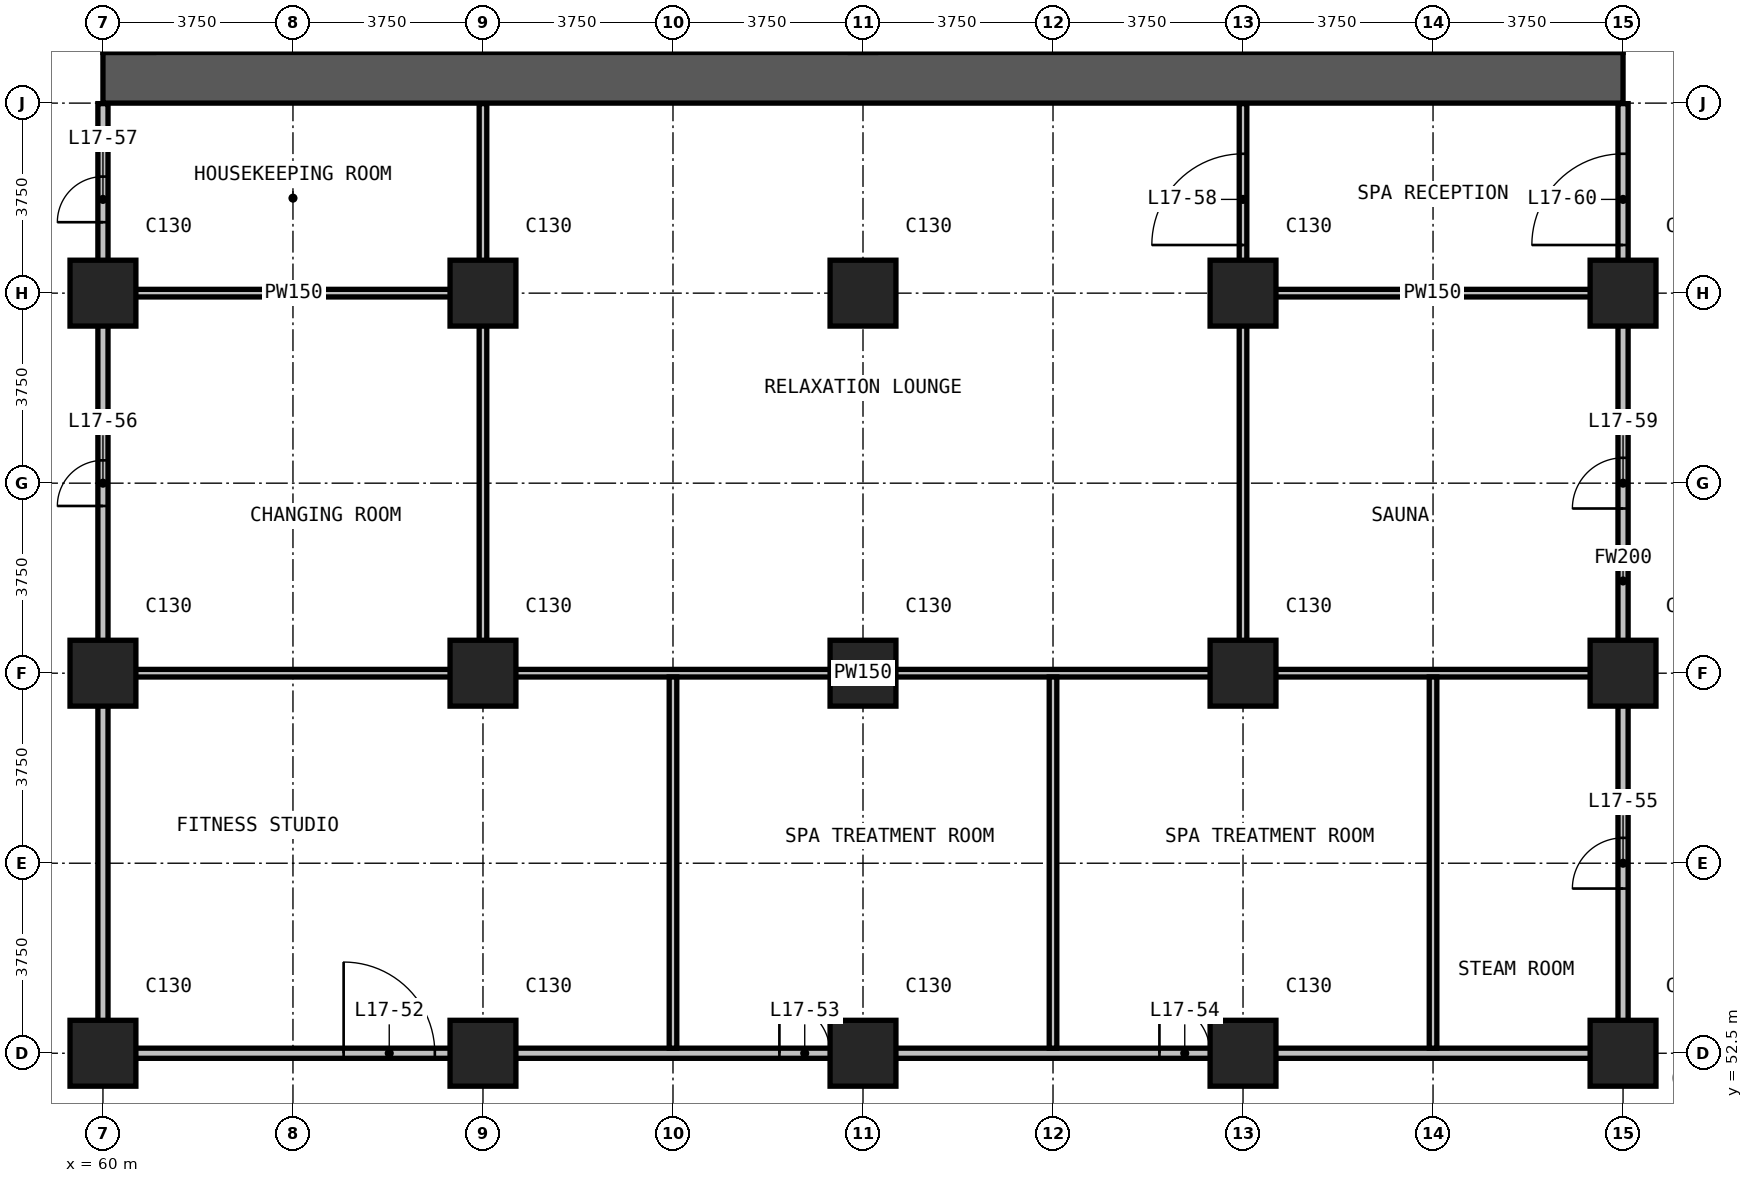
"""IFC4 building model, lengths in metres.
Left out: names, types, materials, properties, quantities, classifications, styles, units other than length and angle.
Written with IfcOpenShell. Run it as: python <this file> out.ifc"""

import sys

from ifc_helpers import new_model, si_unit, direction, frame, frame_2d, origin, origin_2d, place, context, subcontext, project, spatial, rectangle, extrude, element, fill, save


model = new_model("IFC4")
c1 = context("Model", 3, precision=1e-05, world=origin(), true_north=direction((0.0, 1.0)))
c2 = subcontext(c1, "Body", "Model", "MODEL_VIEW")
j1 = project(units=[si_unit("LENGTHUNIT", "METRE"), si_unit("PLANEANGLEUNIT", "RADIAN")], contexts=[c1])
p1 = place(None, origin())
s1 = spatial("IfcSite", under=j1, at=p1, CompositionType="ELEMENT")
p2 = place(p1, origin())
s2 = spatial("IfcBuilding", under=s1, at=p2, CompositionType="ELEMENT")
p3 = place(p2, frame((0.0, 0.0, 75.8)))
s3 = spatial("IfcBuildingStorey", under=s2, at=p3, CompositionType="ELEMENT", Elevation=75.8)
for number, where, z_axis, x_axis in (
    (1, (60.0, 52.5, 0.0), (0.0, 0.0, 1.0), (1.0, 0.0, 0.0)),
    (2, (60.0, 60.0, 0.0), (0.0, 0.0, 1.0), (1.0, 0.0, 0.0)),
    (3, (60.0, 67.5, 0.0), (0.0, 0.0, 1.0), (1.0, 0.0, 0.0)),
    (4, (67.5, 52.5, 0.0), (0.0, 0.0, 1.0), (1.0, 0.0, 0.0)),
    (5, (67.5, 60.0, 0.0), (0.0, 0.0, 1.0), (1.0, 0.0, 0.0)),
    (6, (67.5, 67.5, 0.0), (0.0, 0.0, 1.0), (1.0, 0.0, 0.0)),
    (7, (75.0, 52.5, 0.0), (0.0, 0.0, 1.0), (1.0, 0.0, 0.0)),
    (8, (75.0, 60.0, 0.0), (0.0, 0.0, 1.0), (1.0, 0.0, 0.0)),
    (9, (75.0, 67.5, 0.0), (0.0, 0.0, 1.0), (1.0, 0.0, 0.0)),
    (10, (82.5, 52.5, 0.0), (0.0, 0.0, 1.0), (1.0, 0.0, 0.0)),
    (11, (82.5, 60.0, 0.0), (0.0, 0.0, 1.0), (1.0, 0.0, 0.0)),
    (12, (82.5, 67.5, 0.0), (0.0, 0.0, 1.0), (1.0, 0.0, 0.0)),
    (13, (90.0, 52.5, 0.0), (0.0, 0.0, 1.0), (1.0, 0.0, 0.0)),
    (14, (90.0, 60.0, 0.0), (0.0, 0.0, 1.0), (1.0, 0.0, 0.0)),
    (15, (90.0, 67.5, 0.0), (0.0, 0.0, 1.0), (1.0, 0.0, 0.0)),
):
    element("IfcColumn", number, at=place(p3, frame(where, z_axis=z_axis, x_axis=x_axis)), inside=s3, PredefinedType="COLUMN", context=c2, shape_type="SweptSolid", body=[
        extrude(rectangle(XDim=1.3, YDim=1.3, at=origin_2d()), origin(), (0.0, 0.0, 1.0), 3.3),
    ])
p4 = place(p3, frame((60.0, 71.75, 0.0), z_axis=(0.0, 0.0, 1.0), x_axis=(1.0, 0.0, 0.0)))
e16 = element("IfcWall", 16, at=p4, inside=s3, PredefinedType="SHEAR", context=c2, shape_type="SweptSolid", body=[
    extrude(rectangle(XDim=30.0, YDim=1.0, at=frame_2d((15.0, 0.0))), origin(), (0.0, 0.0, 1.0), 3.3),
])
p5 = place(p3, frame((60.1, 52.5, 0.0), z_axis=(0.0, 0.0, 1.0), x_axis=(1.0, 0.0, 0.0)))
e17 = element("IfcWall", 17, at=p5, inside=s3, PredefinedType="PARTITIONING", context=c2, shape_type="SweptSolid", body=[
    extrude(rectangle(XDim=29.8, YDim=0.2, at=frame_2d((14.9, 0.0))), origin(), (0.0, 0.0, 1.0), 3.0),
])
p6 = place(p5, frame((4.65, 0.0, 0.0)))
e18 = element("IfcOpeningElement", 18, at=p6, cuts=e17, PredefinedType="OPENING", context=c2, shape_type="SweptSolid", body=[
    extrude(rectangle(XDim=1.8, YDim=2.2, at=frame_2d((0.9, 1.1))), frame((0.0, 0.11, 0.0), z_axis=(0.0, -1.0, 0.0), x_axis=(1.0, 0.0, 0.0)), (0.0, 0.0, 1.0), 0.22),
])
p7 = place(p5, frame((13.25, 0.0, 0.0)))
e19 = element("IfcOpeningElement", 19, at=p7, cuts=e17, PredefinedType="OPENING", context=c2, shape_type="SweptSolid", body=[
    extrude(rectangle(XDim=1.0, YDim=2.2, at=frame_2d((0.5, 1.1))), frame((0.0, 0.11, 0.0), z_axis=(0.0, -1.0, 0.0), x_axis=(1.0, 0.0, 0.0)), (0.0, 0.0, 1.0), 0.22),
])
p8 = place(p5, frame((20.75, 0.0, 0.0)))
e20 = element("IfcOpeningElement", 20, at=p8, cuts=e17, PredefinedType="OPENING", context=c2, shape_type="SweptSolid", body=[
    extrude(rectangle(XDim=1.0, YDim=2.2, at=frame_2d((0.5, 1.1))), frame((0.0, 0.11, 0.0), z_axis=(0.0, -1.0, 0.0), x_axis=(1.0, 0.0, 0.0)), (0.0, 0.0, 1.0), 0.22),
])
p9 = place(p3, frame((60.0, 52.4, 0.0), z_axis=(0.0, 0.0, 1.0), x_axis=(0.0, 1.0, 0.0)))
e21 = element("IfcWall", 21, at=p9, inside=s3, PredefinedType="PARTITIONING", context=c2, shape_type="SweptSolid", body=[
    extrude(rectangle(XDim=18.84, YDim=0.2, at=frame_2d((9.42, 0.0))), origin(), (0.0, 0.0, 1.0), 3.0),
])
p10 = place(p9, frame((10.9, 0.0, 0.0)))
e22 = element("IfcOpeningElement", 22, at=p10, cuts=e21, PredefinedType="OPENING", context=c2, shape_type="SweptSolid", body=[
    extrude(rectangle(XDim=0.9, YDim=2.2, at=frame_2d((0.45, 1.1))), frame((0.0, 0.11, 0.0), z_axis=(0.0, -1.0, 0.0), x_axis=(1.0, 0.0, 0.0)), (0.0, 0.0, 1.0), 0.22),
])
p11 = place(p9, frame((16.5, 0.0, 0.0)))
e23 = element("IfcOpeningElement", 23, at=p11, cuts=e21, PredefinedType="OPENING", context=c2, shape_type="SweptSolid", body=[
    extrude(rectangle(XDim=0.9, YDim=2.2, at=frame_2d((0.45, 1.1))), frame((0.0, 0.11, 0.0), z_axis=(0.0, -1.0, 0.0), x_axis=(1.0, 0.0, 0.0)), (0.0, 0.0, 1.0), 0.22),
])
p12 = place(p3, frame((90.0, 52.4, 0.0), z_axis=(0.0, 0.0, 1.0), x_axis=(0.0, 1.0, 0.0)))
e24 = element("IfcWall", 24, at=p12, inside=s3, PredefinedType="PARTITIONING", context=c2, shape_type="SweptSolid", body=[
    extrude(rectangle(XDim=18.84, YDim=0.2, at=frame_2d((9.42, 0.0))), origin(), (0.0, 0.0, 1.0), 3.0),
])
p13 = place(p12, frame((3.35, 0.0, 0.0)))
e25 = element("IfcOpeningElement", 25, at=p13, cuts=e24, PredefinedType="OPENING", context=c2, shape_type="SweptSolid", body=[
    extrude(rectangle(XDim=1.0, YDim=2.2, at=frame_2d((0.5, 1.1))), frame((0.0, 0.11, 0.0), z_axis=(0.0, -1.0, 0.0), x_axis=(1.0, 0.0, 0.0)), (0.0, 0.0, 1.0), 0.22),
])
p14 = place(p12, frame((10.85, 0.0, 0.0)))
e26 = element("IfcOpeningElement", 26, at=p14, cuts=e24, PredefinedType="OPENING", context=c2, shape_type="SweptSolid", body=[
    extrude(rectangle(XDim=1.0, YDim=2.2, at=frame_2d((0.5, 1.1))), frame((0.0, 0.11, 0.0), z_axis=(0.0, -1.0, 0.0), x_axis=(1.0, 0.0, 0.0)), (0.0, 0.0, 1.0), 0.22),
])
p15 = place(p12, frame((16.05, 0.0, 0.0)))
e27 = element("IfcOpeningElement", 27, at=p15, cuts=e24, PredefinedType="OPENING", context=c2, shape_type="SweptSolid", body=[
    extrude(rectangle(XDim=1.8, YDim=2.2, at=frame_2d((0.9, 1.1))), frame((0.0, 0.11, 0.0), z_axis=(0.0, -1.0, 0.0), x_axis=(1.0, 0.0, 0.0)), (0.0, 0.0, 1.0), 0.22),
])
p16 = place(p3, frame((60.1, 60.0, 0.0), z_axis=(0.0, 0.0, 1.0), x_axis=(1.0, 0.0, 0.0)))
e28 = element("IfcWall", 28, at=p16, inside=s3, PredefinedType="PARTITIONING", context=c2, shape_type="SweptSolid", body=[
    extrude(rectangle(XDim=29.8, YDim=0.15, at=frame_2d((14.9, 0.0))), origin(), (0.0, 0.0, 1.0), 3.0),
])
for number, where, z_axis, x_axis in (
    (29, (60.1, 67.5, 0.0), (0.0, 0.0, 1.0), (1.0, 0.0, 0.0)),
    (30, (82.575, 67.5, 0.0), (0.0, 0.0, 1.0), (1.0, 0.0, 0.0)),
):
    element("IfcWall", number, at=place(p3, frame(where, z_axis=z_axis, x_axis=x_axis)), inside=s3, PredefinedType="PARTITIONING", context=c2, shape_type="SweptSolid", body=[
        extrude(rectangle(XDim=7.325, YDim=0.15, at=frame_2d((3.663, 0.0))), origin(), (0.0, 0.0, 1.0), 3.0),
    ])
p17 = place(p3, frame((67.5, 60.075, 0.0), z_axis=(0.0, 0.0, 1.0), x_axis=(0.0, 1.0, 0.0)))
e31 = element("IfcWall", 31, at=p17, inside=s3, PredefinedType="PARTITIONING", context=c2, shape_type="SweptSolid", body=[
    extrude(rectangle(XDim=11.165, YDim=0.15, at=frame_2d((5.583, 0.0))), origin(), (0.0, 0.0, 1.0), 3.0),
])
for number, where, z_axis, x_axis in (
    (32, (71.25, 52.6, 0.0), (0.0, 0.0, 1.0), (0.0, 1.0, 0.0)),
    (33, (78.75, 52.6, 0.0), (0.0, 0.0, 1.0), (0.0, 1.0, 0.0)),
):
    element("IfcWall", number, at=place(p3, frame(where, z_axis=z_axis, x_axis=x_axis)), inside=s3, PredefinedType="PARTITIONING", context=c2, shape_type="SweptSolid", body=[
        extrude(rectangle(XDim=7.325, YDim=0.15, at=frame_2d((3.663, 0.0))), origin(), (0.0, 0.0, 1.0), 3.0),
    ])
p18 = place(p3, frame((82.5, 60.075, 0.0), z_axis=(0.0, 0.0, 1.0), x_axis=(0.0, 1.0, 0.0)))
e34 = element("IfcWall", 34, at=p18, inside=s3, PredefinedType="PARTITIONING", context=c2, shape_type="SweptSolid", body=[
    extrude(rectangle(XDim=11.165, YDim=0.15, at=frame_2d((5.583, 0.0))), origin(), (0.0, 0.0, 1.0), 3.0),
])
p19 = place(p18, frame((8.375, 0.0, 0.0)))
e35 = element("IfcOpeningElement", 35, at=p19, cuts=e34, PredefinedType="OPENING", context=c2, shape_type="SweptSolid", body=[
    extrude(rectangle(XDim=1.8, YDim=2.2, at=frame_2d((0.9, 1.1))), frame((0.0, 0.085, 0.0), z_axis=(0.0, -1.0, 0.0), x_axis=(1.0, 0.0, 0.0)), (0.0, 0.0, 1.0), 0.17),
])
p20 = place(p3, frame((86.25, 52.6, 0.0), z_axis=(0.0, 0.0, 1.0), x_axis=(0.0, 1.0, 0.0)))
e36 = element("IfcWall", 36, at=p20, inside=s3, PredefinedType="PARTITIONING", context=c2, shape_type="SweptSolid", body=[
    extrude(rectangle(XDim=7.325, YDim=0.15, at=frame_2d((3.663, 0.0))), origin(), (0.0, 0.0, 1.0), 3.0),
])
p21 = place(p6, origin())
e37 = element("IfcDoor", 37, at=p21, inside=s3, OperationType="DOUBLE_DOOR_SINGLE_SWING", PredefinedType="DOOR", context=c2, shape_type="SweptSolid", body=[
    extrude(rectangle(XDim=1.8, YDim=2.2, at=frame_2d((0.9, 1.1))), frame((0.0, 0.025, 0.0), z_axis=(0.0, -1.0, 0.0), x_axis=(1.0, 0.0, 0.0)), (0.0, 0.0, 1.0), 0.05),
])
fill(e18, e37)
p22 = place(p7, origin())
e38 = element("IfcDoor", 38, at=p22, inside=s3, OperationType="SINGLE_SWING_LEFT", PredefinedType="DOOR", context=c2, shape_type="SweptSolid", body=[
    extrude(rectangle(XDim=1.0, YDim=2.2, at=frame_2d((0.5, 1.1))), frame((0.0, 0.025, 0.0), z_axis=(0.0, -1.0, 0.0), x_axis=(1.0, 0.0, 0.0)), (0.0, 0.0, 1.0), 0.05),
])
fill(e19, e38)
p23 = place(p8, origin())
e39 = element("IfcDoor", 39, at=p23, inside=s3, OperationType="SINGLE_SWING_RIGHT", PredefinedType="DOOR", context=c2, shape_type="SweptSolid", body=[
    extrude(rectangle(XDim=1.0, YDim=2.2, at=frame_2d((0.5, 1.1))), frame((0.0, 0.025, 0.0), z_axis=(0.0, -1.0, 0.0), x_axis=(1.0, 0.0, 0.0)), (0.0, 0.0, 1.0), 0.05),
])
fill(e20, e39)
p24 = place(p13, origin())
e40 = element("IfcDoor", 40, at=p24, inside=s3, OperationType="SINGLE_SWING_LEFT", PredefinedType="DOOR", context=c2, shape_type="SweptSolid", body=[
    extrude(rectangle(XDim=1.0, YDim=2.2, at=frame_2d((0.5, 1.1))), frame((0.0, 0.025, 0.0), z_axis=(0.0, -1.0, 0.0), x_axis=(1.0, 0.0, 0.0)), (0.0, 0.0, 1.0), 0.05),
])
fill(e25, e40)
p25 = place(p10, origin())
e41 = element("IfcDoor", 41, at=p25, inside=s3, OperationType="SINGLE_SWING_LEFT", PredefinedType="DOOR", context=c2, shape_type="SweptSolid", body=[
    extrude(rectangle(XDim=0.9, YDim=2.2, at=frame_2d((0.45, 1.1))), frame((0.0, 0.025, 0.0), z_axis=(0.0, -1.0, 0.0), x_axis=(1.0, 0.0, 0.0)), (0.0, 0.0, 1.0), 0.05),
])
fill(e22, e41)
p26 = place(p11, origin())
e42 = element("IfcDoor", 42, at=p26, inside=s3, OperationType="SINGLE_SWING_RIGHT", PredefinedType="DOOR", context=c2, shape_type="SweptSolid", body=[
    extrude(rectangle(XDim=0.9, YDim=2.2, at=frame_2d((0.45, 1.1))), frame((0.0, 0.025, 0.0), z_axis=(0.0, -1.0, 0.0), x_axis=(1.0, 0.0, 0.0)), (0.0, 0.0, 1.0), 0.05),
])
fill(e23, e42)
p27 = place(p19, origin())
e43 = element("IfcDoor", 43, at=p27, inside=s3, OperationType="DOUBLE_DOOR_SINGLE_SWING", PredefinedType="DOOR", context=c2, shape_type="SweptSolid", body=[
    extrude(rectangle(XDim=1.8, YDim=2.2, at=frame_2d((0.9, 1.1))), frame((0.0, 0.025, 0.0), z_axis=(0.0, -1.0, 0.0), x_axis=(1.0, 0.0, 0.0)), (0.0, 0.0, 1.0), 0.05),
])
fill(e35, e43)
p28 = place(p14, origin())
e44 = element("IfcDoor", 44, at=p28, inside=s3, OperationType="SINGLE_SWING_RIGHT", PredefinedType="DOOR", context=c2, shape_type="SweptSolid", body=[
    extrude(rectangle(XDim=1.0, YDim=2.2, at=frame_2d((0.5, 1.1))), frame((0.0, 0.025, 0.0), z_axis=(0.0, -1.0, 0.0), x_axis=(1.0, 0.0, 0.0)), (0.0, 0.0, 1.0), 0.05),
])
fill(e26, e44)
p29 = place(p15, origin())
e45 = element("IfcDoor", 45, at=p29, inside=s3, OperationType="DOUBLE_DOOR_SINGLE_SWING", PredefinedType="DOOR", context=c2, shape_type="SweptSolid", body=[
    extrude(rectangle(XDim=1.8, YDim=2.2, at=frame_2d((0.9, 1.1))), frame((0.0, 0.025, 0.0), z_axis=(0.0, -1.0, 0.0), x_axis=(1.0, 0.0, 0.0)), (0.0, 0.0, 1.0), 0.05),
])
fill(e27, e45)
save(model, sys.argv[1])
